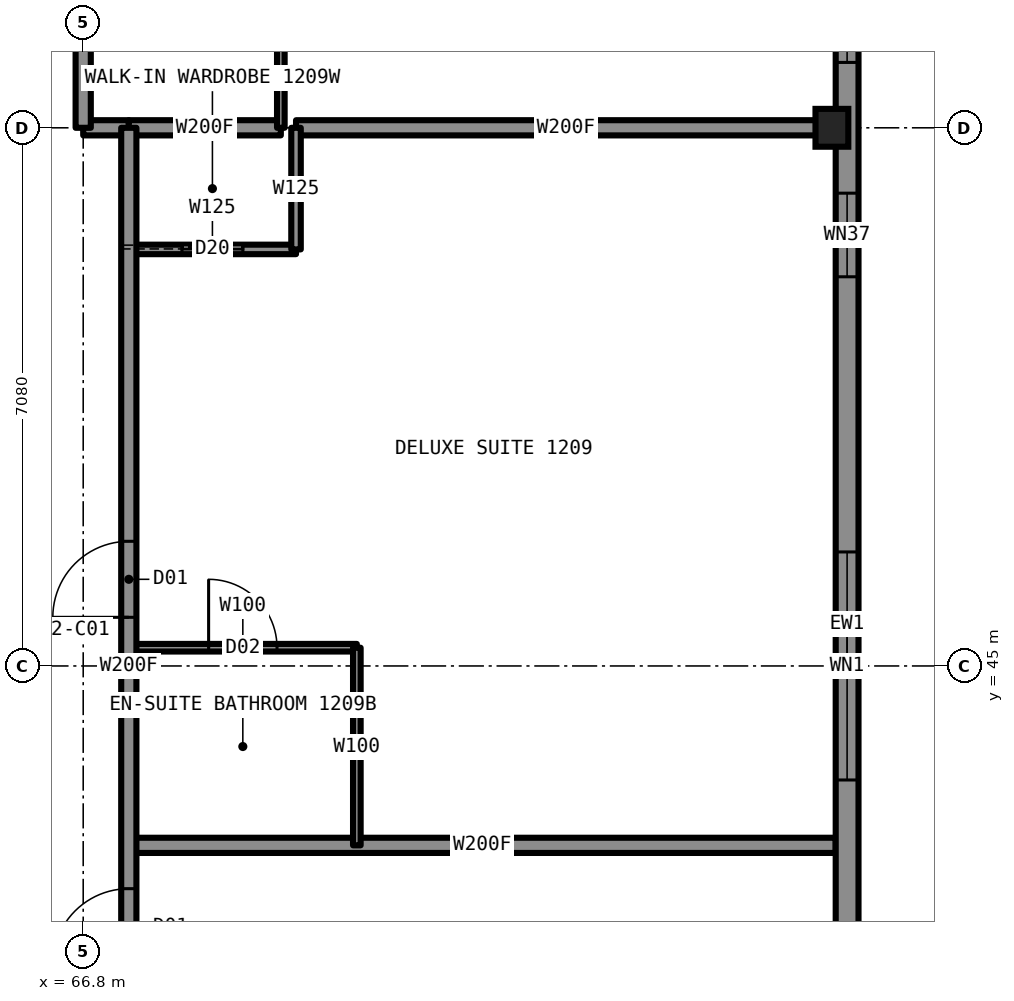
"""IFC4 building model, lengths in metres.
Left out: names, types, materials, properties, quantities, classifications, styles, units other than length and angle.
Written with IfcOpenShell. Run it as: python <this file> out.ifc"""

import sys

from ifc_helpers import new_model, si_unit, direction, frame, frame_2d, origin, origin_2d, place, context, subcontext, project, spatial, rectangle, i_section, extrude, element, fill, save


model = new_model("IFC4")
c1 = context("Model", 3, precision=1e-05, world=origin(), true_north=direction((0.0, 1.0)))
c2 = subcontext(c1, "Body", "Model", "MODEL_VIEW")
j1 = project(units=[si_unit("LENGTHUNIT", "METRE"), si_unit("PLANEANGLEUNIT", "RADIAN")], contexts=[c1])
p1 = place(None, origin())
s1 = spatial("IfcSite", under=j1, at=p1, CompositionType="ELEMENT")
p2 = place(p1, origin())
s2 = spatial("IfcBuilding", under=s1, at=p2, CompositionType="ELEMENT")
p3 = place(p2, frame((0.0, 0.0, 49.5)))
s3 = spatial("IfcBuildingStorey", under=s2, at=p3, CompositionType="ELEMENT", Elevation=49.5)
p4 = place(p3, frame((76.65, 52.08, 0.0), z_axis=(0.0, 0.0, 1.0), x_axis=(1.0, 0.0, 0.0)))
e1 = element("IfcColumn", 1, at=p4, inside=s3, PredefinedType="COLUMN", context=c2, shape_type="SweptSolid", body=[
    extrude(i_section(OverallWidth=0.432, OverallDepth=0.498, WebThickness=0.056, FlangeThickness=0.089, at=origin_2d()), origin(), (0.0, 0.0, 1.0), 3.5),
])
p5 = place(p3, frame((67.4, 42.64, 0.0), z_axis=(0.0, 0.0, 1.0), x_axis=(1.0, 0.0, 0.0)))
e2 = element("IfcWall", 2, at=p5, inside=s3, PredefinedType="PARTITIONING", context=c2, shape_type="SweptSolid", body=[
    extrude(rectangle(XDim=9.3, YDim=0.2, at=frame_2d((4.65, 0.0))), origin(), (0.0, 0.0, 1.0), 2.723),
])
p6 = place(p3, frame((67.4, 45.24, 0.0), z_axis=(0.0, 0.0, 1.0), x_axis=(1.0, 0.0, 0.0)))
e3 = element("IfcWall", 3, at=p6, inside=s3, PredefinedType="PARTITIONING", context=c2, shape_type="SweptSolid", body=[
    extrude(rectangle(XDim=3.0, YDim=0.1, at=frame_2d((1.5, 0.0))), origin(), (0.0, 0.0, 1.0), 3.33),
])
p7 = place(p6, frame((1.05, 0.0, 0.0)))
e4 = element("IfcOpeningElement", 4, at=p7, cuts=e3, PredefinedType="OPENING", context=c2, shape_type="SweptSolid", body=[
    extrude(rectangle(XDim=0.9, YDim=2.1, at=frame_2d((0.45, 1.05))), frame((0.0, 0.06, 0.0), z_axis=(0.0, -1.0, 0.0), x_axis=(1.0, 0.0, 0.0)), (0.0, 0.0, 1.0), 0.12),
])
p8 = place(p3, frame((67.4, 50.48, 0.0), z_axis=(0.0, 0.0, 1.0), x_axis=(1.0, 0.0, 0.0)))
e5 = element("IfcWall", 5, at=p8, inside=s3, PredefinedType="PARTITIONING", context=c2, shape_type="SweptSolid", body=[
    extrude(rectangle(XDim=2.2, YDim=0.125, at=frame_2d((1.1, 0.0))), origin(), (0.0, 0.0, 1.0), 3.33),
])
p9 = place(p8, frame((0.7, 0.0, 0.0)))
e6 = element("IfcOpeningElement", 6, at=p9, cuts=e5, PredefinedType="OPENING", context=c2, shape_type="SweptSolid", body=[
    extrude(rectangle(XDim=0.8, YDim=2.1, at=frame_2d((0.4, 1.05))), frame((0.0, 0.073, 0.0), z_axis=(0.0, -1.0, 0.0), x_axis=(1.0, 0.0, 0.0)), (0.0, 0.0, 1.0), 0.145),
])
p10 = place(p3, frame((66.8, 52.08, 0.0), z_axis=(0.0, 0.0, 1.0), x_axis=(1.0, 0.0, 0.0)))
e7 = element("IfcWall", 7, at=p10, inside=s3, PredefinedType="PARTITIONING", context=c2, shape_type="SweptSolid", body=[
    extrude(rectangle(XDim=0.6, YDim=0.2, at=frame_2d((0.3, 0.0))), origin(), (0.0, 0.0, 1.0), 2.573),
])
p11 = place(p3, frame((67.4, 52.08, 0.0), z_axis=(0.0, 0.0, 1.0), x_axis=(1.0, 0.0, 0.0)))
e8 = element("IfcWall", 8, at=p11, inside=s3, PredefinedType="PARTITIONING", context=c2, shape_type="SweptSolid", body=[
    extrude(rectangle(XDim=2.0, YDim=0.2, at=frame_2d((1.0, 0.0))), origin(), (0.0, 0.0, 1.0), 2.573),
])
p12 = place(p3, frame((69.6, 52.08, 0.0), z_axis=(0.0, 0.0, 1.0), x_axis=(1.0, 0.0, 0.0)))
e9 = element("IfcWall", 9, at=p12, inside=s3, PredefinedType="PARTITIONING", context=c2, shape_type="SweptSolid", body=[
    extrude(rectangle(XDim=7.1, YDim=0.2, at=frame_2d((3.55, 0.0))), origin(), (0.0, 0.0, 1.0), 2.573),
])
p13 = place(p3, frame((66.8, 52.08, 0.0), z_axis=(0.0, 0.0, 1.0), x_axis=(0.0, 1.0, 0.0)))
e10 = element("IfcWall", 10, at=p13, inside=s3, PredefinedType="PARTITIONING", context=c2, shape_type="SweptSolid", body=[
    extrude(rectangle(XDim=4.72, YDim=0.2, at=frame_2d((2.36, 0.0))), origin(), (0.0, 0.0, 1.0), 3.33),
])
p14 = place(p13, frame((2.96, 0.0, 0.0)))
e11 = element("IfcOpeningElement", 11, at=p14, cuts=e10, PredefinedType="OPENING", context=c2, shape_type="SweptSolid", body=[
    extrude(rectangle(XDim=1.1, YDim=2.2, at=frame_2d((0.55, 1.1))), frame((0.0, 0.11, 0.0), z_axis=(0.0, -1.0, 0.0), x_axis=(1.0, 0.0, 0.0)), (0.0, 0.0, 1.0), 0.22),
])
p15 = place(p3, frame((67.4, 37.92, 0.0), z_axis=(0.0, 0.0, 1.0), x_axis=(0.0, 1.0, 0.0)))
e12 = element("IfcWall", 12, at=p15, inside=s3, PredefinedType="PARTITIONING", context=c2, shape_type="SweptSolid", body=[
    extrude(rectangle(XDim=14.16, YDim=0.2, at=frame_2d((7.08, 0.0))), origin(), (0.0, 0.0, 1.0), 3.33),
])
p16 = place(p15, frame((3.15, 0.0, 0.0)))
e13 = element("IfcOpeningElement", 13, at=p16, cuts=e12, PredefinedType="OPENING", context=c2, shape_type="SweptSolid", body=[
    extrude(rectangle(XDim=1.0, YDim=2.2, at=frame_2d((0.5, 1.1))), frame((0.0, 0.11, 0.0), z_axis=(0.0, -1.0, 0.0), x_axis=(1.0, 0.0, 0.0)), (0.0, 0.0, 1.0), 0.22),
])
p17 = place(p15, frame((7.72, 0.0, 0.0)))
e14 = element("IfcOpeningElement", 14, at=p17, cuts=e12, PredefinedType="OPENING", context=c2, shape_type="SweptSolid", body=[
    extrude(rectangle(XDim=1.0, YDim=2.2, at=frame_2d((0.5, 1.1))), frame((0.0, 0.11, 0.0), z_axis=(0.0, -1.0, 0.0), x_axis=(1.0, 0.0, 0.0)), (0.0, 0.0, 1.0), 0.22),
])
p18 = place(p3, frame((69.4, 52.08, 0.0), z_axis=(0.0, 0.0, 1.0), x_axis=(0.0, 1.0, 0.0)))
e15 = element("IfcWall", 15, at=p18, inside=s3, PredefinedType="PARTITIONING", context=c2, shape_type="SweptSolid", body=[
    extrude(rectangle(XDim=2.6, YDim=0.1, at=frame_2d((1.3, 0.0))), origin(), (0.0, 0.0, 1.0), 3.33),
])
p19 = place(p3, frame((69.6, 50.48, 0.0), z_axis=(0.0, 0.0, 1.0), x_axis=(0.0, 1.0, 0.0)))
e16 = element("IfcWall", 16, at=p19, inside=s3, PredefinedType="PARTITIONING", context=c2, shape_type="SweptSolid", body=[
    extrude(rectangle(XDim=1.6, YDim=0.125, at=frame_2d((0.8, 0.0))), origin(), (0.0, 0.0, 1.0), 3.33),
])
p20 = place(p3, frame((70.4, 42.64, 0.0), z_axis=(0.0, 0.0, 1.0), x_axis=(0.0, 1.0, 0.0)))
e17 = element("IfcWall", 17, at=p20, inside=s3, PredefinedType="PARTITIONING", context=c2, shape_type="SweptSolid", body=[
    extrude(rectangle(XDim=2.6, YDim=0.1, at=frame_2d((1.3, 0.0))), origin(), (0.0, 0.0, 1.0), 3.33),
])
p21 = place(p3, frame((76.85, 28.5, 0.0), z_axis=(0.0, 0.0, 1.0), x_axis=(0.0, 1.0, 0.0)))
e18 = element("IfcWall", 18, at=p21, inside=s3, PredefinedType="SOLIDWALL", context=c2, shape_type="SweptSolid", body=[
    extrude(rectangle(XDim=33.0, YDim=0.3, at=frame_2d((16.5, 0.0))), origin(), (0.0, 0.0, 1.0), 2.83),
])
p22 = place(p21, frame((0.85, 0.0, 0.5)))
e19 = element("IfcOpeningElement", 19, at=p22, cuts=e18, PredefinedType="OPENING", context=c2, shape_type="SweptSolid", body=[
    extrude(rectangle(XDim=3.0, YDim=2.0, at=frame_2d((1.5, 1.0))), frame((0.0, 0.16, 0.0), z_axis=(0.0, -1.0, 0.0), x_axis=(1.0, 0.0, 0.0)), (0.0, 0.0, 1.0), 0.32),
])
p23 = place(p21, frame((5.56, 0.0, 0.5)))
e20 = element("IfcOpeningElement", 20, at=p23, cuts=e18, PredefinedType="OPENING", context=c2, shape_type="SweptSolid", body=[
    extrude(rectangle(XDim=3.0, YDim=2.0, at=frame_2d((1.5, 1.0))), frame((0.0, 0.16, 0.0), z_axis=(0.0, -1.0, 0.0), x_axis=(1.0, 0.0, 0.0)), (0.0, 0.0, 1.0), 0.32),
])
p24 = place(p21, frame((10.28, 0.0, 1.1)))
e21 = element("IfcOpeningElement", 21, at=p24, cuts=e18, PredefinedType="OPENING", context=c2, shape_type="SweptSolid", body=[
    extrude(rectangle(XDim=1.1, YDim=1.4, at=frame_2d((0.55, 0.7))), frame((0.0, 0.16, 0.0), z_axis=(0.0, -1.0, 0.0), x_axis=(1.0, 0.0, 0.0)), (0.0, 0.0, 1.0), 0.32),
])
p25 = place(p21, frame((15.0, 0.0, 0.5)))
e22 = element("IfcOpeningElement", 22, at=p25, cuts=e18, PredefinedType="OPENING", context=c2, shape_type="SweptSolid", body=[
    extrude(rectangle(XDim=3.0, YDim=2.0, at=frame_2d((1.5, 1.0))), frame((0.0, 0.16, 0.0), z_axis=(0.0, -1.0, 0.0), x_axis=(1.0, 0.0, 0.0)), (0.0, 0.0, 1.0), 0.32),
])
p26 = place(p21, frame((21.62, 0.0, 1.1)))
e23 = element("IfcOpeningElement", 23, at=p26, cuts=e18, PredefinedType="OPENING", context=c2, shape_type="SweptSolid", body=[
    extrude(rectangle(XDim=1.1, YDim=1.4, at=frame_2d((0.55, 0.7))), frame((0.0, 0.16, 0.0), z_axis=(0.0, -1.0, 0.0), x_axis=(1.0, 0.0, 0.0)), (0.0, 0.0, 1.0), 0.32),
])
p27 = place(p21, frame((24.44, 0.0, 0.5)))
e24 = element("IfcOpeningElement", 24, at=p27, cuts=e18, PredefinedType="OPENING", context=c2, shape_type="SweptSolid", body=[
    extrude(rectangle(XDim=3.0, YDim=2.0, at=frame_2d((1.5, 1.0))), frame((0.0, 0.16, 0.0), z_axis=(0.0, -1.0, 0.0), x_axis=(1.0, 0.0, 0.0)), (0.0, 0.0, 1.0), 0.32),
])
p28 = place(p21, frame((29.15, 0.0, 0.5)))
e25 = element("IfcOpeningElement", 25, at=p28, cuts=e18, PredefinedType="OPENING", context=c2, shape_type="SweptSolid", body=[
    extrude(rectangle(XDim=3.0, YDim=2.0, at=frame_2d((1.5, 1.0))), frame((0.0, 0.16, 0.0), z_axis=(0.0, -1.0, 0.0), x_axis=(1.0, 0.0, 0.0)), (0.0, 0.0, 1.0), 0.32),
])
p29 = place(p16, origin())
e26 = element("IfcDoor", 26, at=p29, inside=s3, OperationType="SINGLE_SWING_LEFT", PredefinedType="DOOR", context=c2, shape_type="SweptSolid", body=[
    extrude(rectangle(XDim=1.0, YDim=2.2, at=frame_2d((0.5, 1.1))), frame((0.0, 0.025, 0.0), z_axis=(0.0, -1.0, 0.0), x_axis=(1.0, 0.0, 0.0)), (0.0, 0.0, 1.0), 0.05),
])
fill(e13, e26)
p30 = place(p17, origin())
e27 = element("IfcDoor", 27, at=p30, inside=s3, OperationType="SINGLE_SWING_LEFT", PredefinedType="DOOR", context=c2, shape_type="SweptSolid", body=[
    extrude(rectangle(XDim=1.0, YDim=2.2, at=frame_2d((0.5, 1.1))), frame((0.0, 0.025, 0.0), z_axis=(0.0, -1.0, 0.0), x_axis=(1.0, 0.0, 0.0)), (0.0, 0.0, 1.0), 0.05),
])
fill(e14, e27)
p31 = place(p7, origin())
e28 = element("IfcDoor", 28, at=p31, inside=s3, OperationType="SINGLE_SWING_RIGHT", PredefinedType="DOOR", context=c2, shape_type="SweptSolid", body=[
    extrude(rectangle(XDim=0.9, YDim=2.1, at=frame_2d((0.45, 1.05))), frame((0.0, 0.025, 0.0), z_axis=(0.0, -1.0, 0.0), x_axis=(1.0, 0.0, 0.0)), (0.0, 0.0, 1.0), 0.05),
])
fill(e4, e28)
p32 = place(p9, origin())
e29 = element("IfcDoor", 29, at=p32, inside=s3, OperationType="SLIDING_TO_LEFT", PredefinedType="DOOR", context=c2, shape_type="SweptSolid", body=[
    extrude(rectangle(XDim=0.8, YDim=2.1, at=frame_2d((0.4, 1.05))), frame((0.0, 0.025, 0.0), z_axis=(0.0, -1.0, 0.0), x_axis=(1.0, 0.0, 0.0)), (0.0, 0.0, 1.0), 0.05),
])
fill(e6, e29)
p33 = place(p25, origin())
e30 = element("IfcWindow", 30, at=p33, inside=s3, PartitioningType="SINGLE_PANEL", PredefinedType="WINDOW", context=c2, shape_type="SweptSolid", body=[
    extrude(rectangle(XDim=3.0, YDim=2.0, at=frame_2d((1.5, 1.0))), frame((0.0, 0.03, 0.0), z_axis=(0.0, -1.0, 0.0), x_axis=(1.0, 0.0, 0.0)), (0.0, 0.0, 1.0), 0.06),
])
fill(e22, e30)
p34 = place(p26, origin())
e31 = element("IfcWindow", 31, at=p34, inside=s3, PartitioningType="SINGLE_PANEL", PredefinedType="WINDOW", context=c2, shape_type="SweptSolid", body=[
    extrude(rectangle(XDim=1.1, YDim=1.4, at=frame_2d((0.55, 0.7))), frame((0.0, 0.03, 0.0), z_axis=(0.0, -1.0, 0.0), x_axis=(1.0, 0.0, 0.0)), (0.0, 0.0, 1.0), 0.06),
])
fill(e23, e31)
p35 = place(p27, origin())
e32 = element("IfcWindow", 32, at=p35, inside=s3, PartitioningType="SINGLE_PANEL", PredefinedType="WINDOW", context=c2, shape_type="SweptSolid", body=[
    extrude(rectangle(XDim=3.0, YDim=2.0, at=frame_2d((1.5, 1.0))), frame((0.0, 0.03, 0.0), z_axis=(0.0, -1.0, 0.0), x_axis=(1.0, 0.0, 0.0)), (0.0, 0.0, 1.0), 0.06),
])
fill(e24, e32)
save(model, sys.argv[1])
